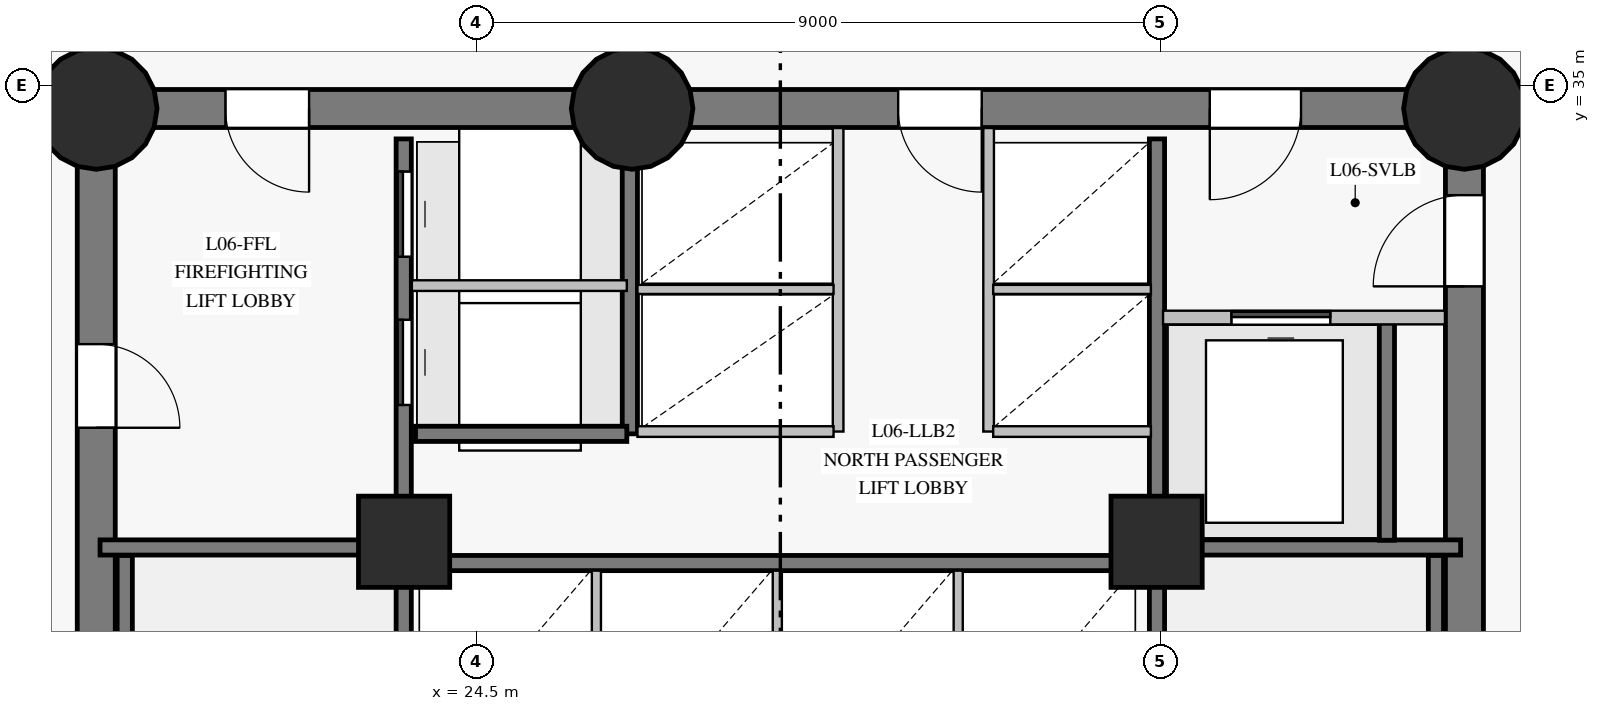
"""IFC4 building model, lengths in metres.
Left out: names, types, materials, properties, quantities, classifications, styles, units other than length and angle.
Written with IfcOpenShell. Run it as: python <this file> out.ifc"""

import sys

from ifc_helpers import new_model, si_unit, direction, frame, frame_2d, origin, origin_with_axes, origin_2d, place, context, subcontext, project, spatial, rectangle, circle, extrude, source, transform, mapped, element, fill, save


model = new_model("IFC4")
c1 = context("Model", 3, precision=1e-05, world=origin(), true_north=direction((0.0, 1.0)))
c2 = subcontext(c1, "Body", "Model", "MODEL_VIEW")
j1 = project(units=[si_unit("LENGTHUNIT", "METRE"), si_unit("PLANEANGLEUNIT", "RADIAN")], contexts=[c1])
p1 = place(None, origin())
s1 = spatial("IfcSite", under=j1, at=p1, CompositionType="ELEMENT")
p2 = place(p1, origin())
s2 = spatial("IfcBuilding", under=s1, at=p2, CompositionType="ELEMENT")
p3 = place(p2, frame((0.0, 0.0, 26.5)))
s3 = spatial("IfcBuildingStorey", under=s2, at=p3, CompositionType="ELEMENT", Elevation=26.5)
p4 = place(p3, frame((37.5, 18.3, 0.0), z_axis=(0.0, 0.0, 1.0), x_axis=(0.0, 1.0, 0.0)))
e1 = element("IfcWall", 1, at=p4, inside=s3, PredefinedType="SHEAR", context=c2, shape_type="SweptSolid", body=[
    extrude(rectangle(XDim=16.4, YDim=0.5, at=frame_2d((8.2, 0.0))), origin(), (0.0, 0.0, 1.0), 3.35),
])
p5 = place(p4, frame((14.06, 0.0, 0.0)))
e2 = element("IfcOpeningElement", 2, at=p5, cuts=e1, PredefinedType="OPENING", context=c2, shape_type="SweptSolid", body=[
    extrude(rectangle(XDim=1.2, YDim=2.15, at=frame_2d((0.6, 1.075))), frame((0.0, 0.26, 0.0), z_axis=(0.0, -1.0, 0.0), x_axis=(1.0, 0.0, 0.0)), (0.0, 0.0, 1.0), 0.52),
])
p6 = place(p3, frame((37.5, 34.7, 0.0), z_axis=(0.0, 0.0, 1.0), x_axis=(-1.0, 0.0, 0.0)))
e3 = element("IfcWall", 3, at=p6, inside=s3, PredefinedType="SHEAR", context=c2, shape_type="SweptSolid", body=[
    extrude(rectangle(XDim=10.95, YDim=0.5, at=frame_2d((5.475, 0.0))), origin(), (0.0, 0.0, 1.0), 3.35),
])
p7 = place(p6, frame((2.15, 0.0, 0.0)))
e4 = element("IfcOpeningElement", 4, at=p7, cuts=e3, PredefinedType="OPENING", context=c2, shape_type="SweptSolid", body=[
    extrude(rectangle(XDim=1.2, YDim=2.15, at=frame_2d((0.6, 1.075))), frame((0.0, 0.26, 0.0), z_axis=(0.0, -1.0, 0.0), x_axis=(1.0, 0.0, 0.0)), (0.0, 0.0, 1.0), 0.52),
])
p8 = place(p6, frame((6.35, 0.0, 0.0)))
e5 = element("IfcOpeningElement", 5, at=p8, cuts=e3, PredefinedType="OPENING", context=c2, shape_type="SweptSolid", body=[
    extrude(rectangle(XDim=1.1, YDim=2.15, at=frame_2d((0.55, 1.075))), frame((0.0, 0.26, 0.0), z_axis=(0.0, -1.0, 0.0), x_axis=(1.0, 0.0, 0.0)), (0.0, 0.0, 1.0), 0.52),
])
p9 = place(p3, frame((26.55, 34.7, 0.0), z_axis=(0.0, 0.0, 1.0), x_axis=(-1.0, 0.0, 0.0)))
e6 = element("IfcWall", 6, at=p9, inside=s3, PredefinedType="SHEAR", context=c2, shape_type="SweptSolid", body=[
    extrude(rectangle(XDim=7.05, YDim=0.5, at=frame_2d((3.525, 0.0))), origin(), (0.0, 0.0, 1.0), 3.35),
])
p10 = place(p9, frame((4.25, 0.0, 0.0)))
e7 = element("IfcOpeningElement", 7, at=p10, cuts=e6, PredefinedType="OPENING", context=c2, shape_type="SweptSolid", body=[
    extrude(rectangle(XDim=1.1, YDim=2.15, at=frame_2d((0.55, 1.075))), frame((0.0, 0.26, 0.0), z_axis=(0.0, -1.0, 0.0), x_axis=(1.0, 0.0, 0.0)), (0.0, 0.0, 1.0), 0.52),
])
p11 = place(p3, frame((19.5, 34.7, 0.0), z_axis=(0.0, 0.0, 1.0), x_axis=(0.0, -1.0, 0.0)))
e8 = element("IfcWall", 8, at=p11, inside=s3, PredefinedType="SHEAR", context=c2, shape_type="SweptSolid", body=[
    extrude(rectangle(XDim=16.4, YDim=0.5, at=frame_2d((8.2, 0.0))), origin(), (0.0, 0.0, 1.0), 3.35),
])
p12 = place(p11, frame((3.1, 0.0, 0.0)))
e9 = element("IfcOpeningElement", 9, at=p12, cuts=e8, PredefinedType="OPENING", context=c2, shape_type="SweptSolid", body=[
    extrude(rectangle(XDim=1.1, YDim=2.15, at=frame_2d((0.55, 1.075))), frame((0.0, 0.26, 0.0), z_axis=(0.0, -1.0, 0.0), x_axis=(1.0, 0.0, 0.0)), (0.0, 0.0, 1.0), 0.52),
])
m1 = source(origin_with_axes(), c2, "Body", "SweptSolid", [
    extrude(circle(Radius=0.8, at=origin_2d()), origin(), (0.0, 0.0, 1.0), 3.6),
])
for number, where, z_axis, x_axis in (
    (10, (19.5, 34.7, 0.0), (0.0, 0.0, 1.0), (1.0, 0.0, 0.0)),
    (11, (26.55, 34.7, 0.0), (0.0, 0.0, 1.0), (1.0, 0.0, 0.0)),
    (12, (37.5, 34.7, 0.0), (0.0, 0.0, 1.0), (1.0, 0.0, 0.0)),
):
    element("IfcColumn", number, at=place(p3, frame(where, z_axis=z_axis, x_axis=x_axis)), inside=s3, PredefinedType="COLUMN", context=c2, shape_type="MappedRepresentation", body=[
        mapped(m1, transform((0.0, 0.0, 0.0), scale=1.0)),
    ])
m2 = source(origin_with_axes(), c2, "Body", "SweptSolid", [
    extrude(rectangle(XDim=1.2, YDim=1.2, at=origin_2d()), origin(), (0.0, 0.0, 1.0), 3.6),
])
for number, where, z_axis, x_axis in (
    (13, (23.55, 29.0, 0.0), (0.0, 0.0, 1.0), (1.0, 0.0, 0.0)),
    (14, (33.45, 29.0, 0.0), (0.0, 0.0, 1.0), (1.0, 0.0, 0.0)),
):
    element("IfcColumn", number, at=place(p3, frame(where, z_axis=z_axis, x_axis=x_axis)), inside=s3, PredefinedType="COLUMN", context=c2, shape_type="MappedRepresentation", body=[
        mapped(m2, transform((0.0, 0.0, 0.0), scale=1.0)),
    ])
p13 = place(p3, frame((23.545, 18.7, 0.0), z_axis=(0.0, 0.0, 1.0), x_axis=(0.0, 1.0, 0.0)))
e15 = element("IfcWall", 15, at=p13, inside=s3, PredefinedType="SHEAR", context=c2, shape_type="SweptSolid", body=[
    extrude(rectangle(XDim=15.6, YDim=0.2, at=frame_2d((7.8, 0.0))), origin(), (0.0, 0.0, 1.0), 3.35),
])
p14 = place(p13, frame((2.75, 0.0, 0.0)))
e16 = element("IfcOpeningElement", 16, at=p14, cuts=e15, PredefinedType="OPENING", context=c2, shape_type="SweptSolid", body=[
    extrude(rectangle(XDim=1.15, YDim=2.15, at=frame_2d((0.575, 1.075))), frame((0.0, 0.11, 0.0), z_axis=(0.0, -1.0, 0.0), x_axis=(1.0, 0.0, 0.0)), (0.0, 0.0, 1.0), 0.22),
])
p15 = place(p13, frame((0.14, 0.0, 0.0)))
e17 = element("IfcOpeningElement", 17, at=p15, cuts=e15, PredefinedType="OPENING", context=c2, shape_type="SweptSolid", body=[
    extrude(rectangle(XDim=0.88, YDim=2.1, at=frame_2d((0.44, 1.05))), frame((0.0, 0.11, 0.0), z_axis=(0.0, -1.0, 0.0), x_axis=(1.0, 0.0, 0.0)), (0.0, 0.0, 1.0), 0.22),
])
p16 = place(p13, frame((1.36, 0.0, 0.0)))
e18 = element("IfcOpeningElement", 18, at=p16, cuts=e15, PredefinedType="OPENING", context=c2, shape_type="SweptSolid", body=[
    extrude(rectangle(XDim=0.88, YDim=2.1, at=frame_2d((0.44, 1.05))), frame((0.0, 0.11, 0.0), z_axis=(0.0, -1.0, 0.0), x_axis=(1.0, 0.0, 0.0)), (0.0, 0.0, 1.0), 0.22),
])
p17 = place(p13, frame((12.1, 0.0, 0.0)))
e19 = element("IfcOpeningElement", 19, at=p17, cuts=e15, PredefinedType="OPENING", context=c2, shape_type="SweptSolid", body=[
    extrude(rectangle(XDim=1.12, YDim=2.15, at=frame_2d((0.56, 1.075))), frame((0.0, 0.11, 0.0), z_axis=(0.0, -1.0, 0.0), x_axis=(1.0, 0.0, 0.0)), (0.0, 0.0, 1.0), 0.22),
])
p18 = place(p13, frame((14.05, 0.0, 0.0)))
e20 = element("IfcOpeningElement", 20, at=p18, cuts=e15, PredefinedType="OPENING", context=c2, shape_type="SweptSolid", body=[
    extrude(rectangle(XDim=1.12, YDim=2.15, at=frame_2d((0.56, 1.075))), frame((0.0, 0.11, 0.0), z_axis=(0.0, -1.0, 0.0), x_axis=(1.0, 0.0, 0.0)), (0.0, 0.0, 1.0), 0.22),
])
p19 = place(p3, frame((33.455, 18.7, 0.0), z_axis=(0.0, 0.0, 1.0), x_axis=(0.0, 1.0, 0.0)))
e21 = element("IfcWall", 21, at=p19, inside=s3, PredefinedType="SHEAR", context=c2, shape_type="SweptSolid", body=[
    extrude(rectangle(XDim=15.6, YDim=0.2, at=frame_2d((7.8, 0.0))), origin(), (0.0, 0.0, 1.0), 3.35),
])
p20 = place(p19, frame((2.75, 0.0, 0.0)))
e22 = element("IfcOpeningElement", 22, at=p20, cuts=e21, PredefinedType="OPENING", context=c2, shape_type="SweptSolid", body=[
    extrude(rectangle(XDim=1.15, YDim=2.15, at=frame_2d((0.575, 1.075))), frame((0.0, 0.11, 0.0), z_axis=(0.0, -1.0, 0.0), x_axis=(1.0, 0.0, 0.0)), (0.0, 0.0, 1.0), 0.22),
])
p21 = place(p19, frame((0.55, 0.0, 0.0)))
e23 = element("IfcOpeningElement", 23, at=p21, cuts=e21, PredefinedType="OPENING", context=c2, shape_type="SweptSolid", body=[
    extrude(rectangle(XDim=0.94, YDim=2.1, at=frame_2d((0.47, 1.05))), frame((0.0, 0.11, 0.0), z_axis=(0.0, -1.0, 0.0), x_axis=(1.0, 0.0, 0.0)), (0.0, 0.0, 1.0), 0.22),
])
p22 = place(p3, frame((23.7, 28.72, 0.0), z_axis=(0.0, 0.0, 1.0), x_axis=(1.0, 0.0, 0.0)))
e24 = element("IfcWall", 24, at=p22, inside=s3, PredefinedType="SHEAR", context=c2, shape_type="SweptSolid", body=[
    extrude(rectangle(XDim=9.6, YDim=0.2, at=frame_2d((4.8, 0.0))), origin(), (0.0, 0.0, 1.0), 3.35),
])
for number, where, z_axis, x_axis in (
    (25, (19.875, 21.32, 0.0), (0.0, 0.0, 1.0), (0.0, 1.0, 0.0)),
    (26, (37.125, 21.32, 0.0), (0.0, 0.0, 1.0), (0.0, 1.0, 0.0)),
):
    element("IfcWall", number, at=place(p3, frame(where, z_axis=z_axis, x_axis=x_axis)), inside=s3, PredefinedType="SHEAR", context=c2, shape_type="SweptSolid", body=[
        extrude(rectangle(XDim=7.5, YDim=0.2, at=frame_2d((3.75, 0.0))), origin(), (0.0, 0.0, 1.0), 3.35),
    ])
for number, where, z_axis, x_axis in (
    (27, (33.455, 28.925, 0.0), (0.0, 0.0, 1.0), (1.0, 0.0, 0.0)),
    (28, (19.55, 28.925, 0.0), (0.0, 0.0, 1.0), (1.0, 0.0, 0.0)),
):
    element("IfcWall", number, at=place(p3, frame(where, z_axis=z_axis, x_axis=x_axis)), inside=s3, PredefinedType="SHEAR", context=c2, shape_type="SweptSolid", body=[
        extrude(rectangle(XDim=3.995, YDim=0.2, at=frame_2d((1.998, 0.0))), origin(), (0.0, 0.0, 1.0), 3.35),
    ])
p23 = place(p3, frame((26.52, 30.42, 0.0), z_axis=(0.0, 0.0, 1.0), x_axis=(0.0, 1.0, 0.0)))
e29 = element("IfcWall", 29, at=p23, inside=s3, PredefinedType="SHEAR", context=c2, shape_type="SweptSolid", body=[
    extrude(rectangle(XDim=3.86, YDim=0.2, at=frame_2d((1.93, 0.0))), origin(), (0.0, 0.0, 1.0), 3.35),
])
p24 = place(p3, frame((36.48, 29.02, 0.0), z_axis=(0.0, 0.0, 1.0), x_axis=(0.0, 1.0, 0.0)))
e30 = element("IfcWall", 30, at=p24, inside=s3, PredefinedType="SHEAR", context=c2, shape_type="SweptSolid", body=[
    extrude(rectangle(XDim=2.86, YDim=0.2, at=frame_2d((1.43, 0.0))), origin(), (0.0, 0.0, 1.0), 3.35),
])
p25 = place(p3, frame((23.7, 30.42, 0.0), z_axis=(0.0, 0.0, 1.0), x_axis=(1.0, 0.0, 0.0)))
e31 = element("IfcWall", 31, at=p25, inside=s3, PredefinedType="SHEAR", context=c2, shape_type="SweptSolid", body=[
    extrude(rectangle(XDim=2.78, YDim=0.2, at=frame_2d((1.39, 0.0))), origin(), (0.0, 0.0, 1.0), 3.35),
])
for number, where, z_axis, x_axis in (
    (32, (29.26, 30.45, 0.0), (0.0, 0.0, 1.0), (0.0, 1.0, 0.0)),
    (33, (31.24, 30.45, 0.0), (0.0, 0.0, 1.0), (0.0, 1.0, 0.0)),
):
    element("IfcWall", number, at=place(p3, frame(where, z_axis=z_axis, x_axis=x_axis)), inside=s3, PredefinedType="PARTITIONING", context=c2, shape_type="SweptSolid", body=[
        extrude(rectangle(XDim=3.993, YDim=0.14, at=frame_2d((1.997, 0.0))), origin(), (0.0, 0.0, 1.0), 3.35),
    ])
p26 = place(p3, frame((33.535, 31.95, 0.0), z_axis=(0.0, 0.0, 1.0), x_axis=(1.0, 0.0, 0.0)))
e34 = element("IfcWall", 34, at=p26, inside=s3, PredefinedType="PARTITIONING", context=c2, shape_type="SweptSolid", body=[
    extrude(rectangle(XDim=3.709, YDim=0.18, at=frame_2d((1.854, 0.0))), origin(), (0.0, 0.0, 1.0), 3.35),
])
p27 = place(p26, frame((0.9, 0.0, 0.0)))
e35 = element("IfcOpeningElement", 35, at=p27, cuts=e34, PredefinedType="OPENING", context=c2, shape_type="SweptSolid", body=[
    extrude(rectangle(XDim=1.3, YDim=2.2, at=frame_2d((0.65, 1.1))), frame((0.0, 0.1, 0.0), z_axis=(0.0, -1.0, 0.0), x_axis=(1.0, 0.0, 0.0)), (0.0, 0.0, 1.0), 0.2),
])
p28 = place(p3, frame((23.652, 32.37, 0.0), z_axis=(0.0, 0.0, 1.0), x_axis=(1.0, 0.0, 0.0)))
e36 = element("IfcWall", 36, at=p28, inside=s3, PredefinedType="PARTITIONING", context=c2, shape_type="SweptSolid", body=[
    extrude(rectangle(XDim=2.828, YDim=0.14, at=frame_2d((1.414, 0.0))), origin(), (0.0, 0.0, 1.0), 3.35),
])
for number, where, z_axis, x_axis in (
    (37, (26.08, 26.02, 0.0), (0.0, 0.0, 1.0), (0.0, 1.0, 0.0)),
    (38, (28.46, 26.02, 0.0), (0.0, 0.0, 1.0), (0.0, 1.0, 0.0)),
    (39, (30.84, 26.02, 0.0), (0.0, 0.0, 1.0), (0.0, 1.0, 0.0)),
):
    element("IfcWall", number, at=place(p3, frame(where, z_axis=z_axis, x_axis=x_axis)), inside=s3, PredefinedType="PARTITIONING", context=c2, shape_type="SweptSolid", body=[
        extrude(rectangle(XDim=2.6, YDim=0.12, at=frame_2d((1.3, 0.0))), origin(), (0.0, 0.0, 1.0), 3.35),
    ])
p29 = place(p3, frame((26.62, 30.45, 0.0), z_axis=(0.0, 0.0, 1.0), x_axis=(1.0, 0.0, 0.0)))
e40 = element("IfcWall", 40, at=p29, inside=s3, PredefinedType="PARTITIONING", context=c2, shape_type="SweptSolid", body=[
    extrude(rectangle(XDim=2.58, YDim=0.14, at=frame_2d((1.29, 0.0))), origin(), (0.0, 0.0, 1.0), 3.35),
])
p30 = place(p3, frame((26.62, 32.32, 0.0), z_axis=(0.0, 0.0, 1.0), x_axis=(1.0, 0.0, 0.0)))
e41 = element("IfcWall", 41, at=p30, inside=s3, PredefinedType="PARTITIONING", context=c2, shape_type="SweptSolid", body=[
    extrude(rectangle(XDim=2.58, YDim=0.12, at=frame_2d((1.29, 0.0))), origin(), (0.0, 0.0, 1.0), 3.35),
])
p31 = place(p3, frame((31.3, 30.45, 0.0), z_axis=(0.0, 0.0, 1.0), x_axis=(1.0, 0.0, 0.0)))
e42 = element("IfcWall", 42, at=p31, inside=s3, PredefinedType="PARTITIONING", context=c2, shape_type="SweptSolid", body=[
    extrude(rectangle(XDim=2.075, YDim=0.14, at=frame_2d((1.038, 0.0))), origin(), (0.0, 0.0, 1.0), 3.35),
])
p32 = place(p3, frame((31.3, 32.32, 0.0), z_axis=(0.0, 0.0, 1.0), x_axis=(1.0, 0.0, 0.0)))
e43 = element("IfcWall", 43, at=p32, inside=s3, PredefinedType="PARTITIONING", context=c2, shape_type="SweptSolid", body=[
    extrude(rectangle(XDim=2.075, YDim=0.12, at=frame_2d((1.038, 0.0))), origin(), (0.0, 0.0, 1.0), 3.35),
])
m3 = source(origin_with_axes(), c2, "Body", "SweptSolid", [
    extrude(rectangle(XDim=1.1, YDim=2.15, at=frame_2d((0.55, 1.075))), frame((0.0, 0.025, 0.0), z_axis=(0.0, -1.0, 0.0), x_axis=(1.0, 0.0, 0.0)), (0.0, 0.0, 1.0), 0.05),
])
p33 = place(p10, origin())
e44 = element("IfcDoor", 44, at=p33, inside=s3, OperationType="SINGLE_SWING_LEFT", PredefinedType="DOOR", context=c2, shape_type="MappedRepresentation", body=[
    mapped(m3, transform((0.0, 0.0, 0.0), scale=1.0)),
])
fill(e7, e44)
p34 = place(p12, origin())
e45 = element("IfcDoor", 45, at=p34, inside=s3, OperationType="SINGLE_SWING_RIGHT", PredefinedType="DOOR", context=c2, shape_type="MappedRepresentation", body=[
    mapped(m3, transform((0.0, 0.0, 0.0), scale=1.0)),
])
fill(e9, e45)
m4 = source(origin_with_axes(), c2, "Body", "SweptSolid", [
    extrude(rectangle(XDim=1.2, YDim=2.15, at=frame_2d((0.6, 1.075))), frame((0.0, 0.025, 0.0), z_axis=(0.0, -1.0, 0.0), x_axis=(1.0, 0.0, 0.0)), (0.0, 0.0, 1.0), 0.05),
])
p35 = place(p5, origin())
e46 = element("IfcDoor", 46, at=p35, inside=s3, OperationType="SINGLE_SWING_LEFT", PredefinedType="DOOR", context=c2, shape_type="MappedRepresentation", body=[
    mapped(m4, transform((0.0, 0.0, 0.0), scale=1.0)),
])
fill(e2, e46)
p36 = place(p7, origin())
e47 = element("IfcDoor", 47, at=p36, inside=s3, OperationType="SINGLE_SWING_RIGHT", PredefinedType="DOOR", context=c2, shape_type="MappedRepresentation", body=[
    mapped(m4, transform((0.0, 0.0, 0.0), scale=1.0)),
])
fill(e4, e47)
m5 = source(origin_with_axes(), c2, "Body", "SweptSolid", [
    extrude(rectangle(XDim=1.3, YDim=2.2, at=frame_2d((0.65, 1.1))), frame((0.0, 0.025, 0.0), z_axis=(0.0, -1.0, 0.0), x_axis=(1.0, 0.0, 0.0)), (0.0, 0.0, 1.0), 0.05),
])
p37 = place(p27, origin())
e48 = element("IfcDoor", 48, at=p37, inside=s3, OperationType="SLIDING_TO_LEFT", PredefinedType="DOOR", context=c2, shape_type="MappedRepresentation", body=[
    mapped(m5, transform((0.0, 0.0, 0.0), scale=1.0)),
])
fill(e35, e48)
p38 = place(p8, origin())
e49 = element("IfcDoor", 49, at=p38, inside=s3, OperationType="SINGLE_SWING_LEFT", PredefinedType="DOOR", context=c2, shape_type="MappedRepresentation", body=[
    mapped(m3, transform((0.0, 0.0, 0.0), scale=1.0)),
])
fill(e5, e49)
m6 = source(origin_with_axes(), c2, "Body", "SweptSolid", [
    extrude(rectangle(XDim=1.12, YDim=2.15, at=frame_2d((0.56, 1.075))), frame((0.0, 0.025, 0.0), z_axis=(0.0, -1.0, 0.0), x_axis=(1.0, 0.0, 0.0)), (0.0, 0.0, 1.0), 0.05),
])
p39 = place(p17, origin())
e50 = element("IfcDoor", 50, at=p39, inside=s3, OperationType="SLIDING_TO_LEFT", PredefinedType="DOOR", context=c2, shape_type="MappedRepresentation", body=[
    mapped(m6, transform((0.0, 0.0, 0.0), scale=1.0)),
])
fill(e19, e50)
p40 = place(p18, origin())
e51 = element("IfcDoor", 51, at=p40, inside=s3, OperationType="SLIDING_TO_RIGHT", PredefinedType="DOOR", context=c2, shape_type="MappedRepresentation", body=[
    mapped(m6, transform((0.0, 0.0, 0.0), scale=1.0)),
])
fill(e20, e51)
save(model, sys.argv[1])
